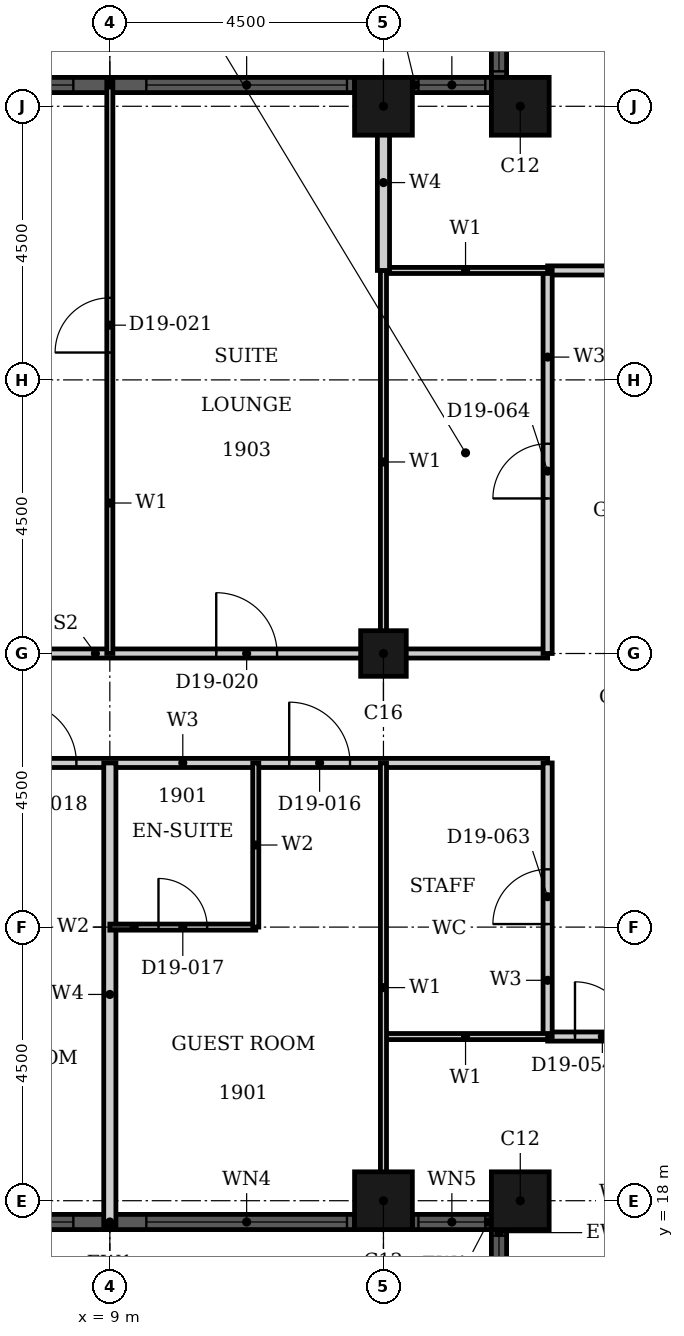
"""IFC4 building model, lengths in metres.
Left out: names, types, materials, properties, quantities, classifications, styles, units other than length and angle.
Written with IfcOpenShell. Run it as: python <this file> out.ifc"""

import sys

from ifc_helpers import new_model, si_unit, direction, frame, frame_2d, origin, origin_2d, place, context, subcontext, project, spatial, rectangle, hollow_rectangle, extrude, element, fill, save


model = new_model("IFC4")
c1 = context("Model", 3, precision=1e-05, world=origin(), true_north=direction((0.0, 1.0)))
c2 = subcontext(c1, "Body", "Model", "MODEL_VIEW")
j1 = project(units=[si_unit("LENGTHUNIT", "METRE"), si_unit("PLANEANGLEUNIT", "RADIAN")], contexts=[c1])
p1 = place(None, origin())
s1 = spatial("IfcSite", under=j1, at=p1, CompositionType="ELEMENT")
p2 = place(p1, origin())
s2 = spatial("IfcBuilding", under=s1, at=p2, CompositionType="ELEMENT")
p3 = place(p2, frame((0.0, 0.0, 81.6)))
s3 = spatial("IfcBuildingStorey", under=s2, at=p3, CompositionType="ELEMENT", Elevation=81.6)
for number, where, z_axis, x_axis in (
    (1, (15.75, 36.0, 0.0), (0.0, 0.0, 1.0), (1.0, 0.0, 0.0)),
    (2, (13.5, 36.0, 0.0), (0.0, 0.0, 1.0), (1.0, 0.0, 0.0)),
    (3, (13.5, 18.0, 0.0), (0.0, 0.0, 1.0), (1.0, 0.0, 0.0)),
    (4, (15.75, 18.0, 0.0), (0.0, 0.0, 1.0), (1.0, 0.0, 0.0)),
):
    element("IfcColumn", number, at=place(p3, frame(where, z_axis=z_axis, x_axis=x_axis)), inside=s3, PredefinedType="COLUMN", context=c2, shape_type="SweptSolid", body=[
        extrude(hollow_rectangle(XDim=0.95, YDim=0.95, WallThickness=0.03, at=origin_2d()), origin(), (0.0, 0.0, 1.0), 3.6),
    ])
p4 = place(p3, frame((13.5, 27.0, 0.0), z_axis=(0.0, 0.0, 1.0), x_axis=(1.0, 0.0, 0.0)))
e5 = element("IfcColumn", 5, at=p4, inside=s3, PredefinedType="COLUMN", context=c2, shape_type="SweptSolid", body=[
    extrude(hollow_rectangle(XDim=0.75, YDim=0.75, WallThickness=0.024, at=origin_2d()), origin(), (0.0, 0.0, 1.0), 3.6),
])
p5 = place(p3, frame((15.4, 37.775, 0.0), z_axis=(0.0, 0.0, 1.0), x_axis=(0.0, -1.0, 0.0)))
e6 = element("IfcWall", 6, at=p5, inside=s3, PredefinedType="SOLIDWALL", context=c2, shape_type="SweptSolid", body=[
    extrude(rectangle(XDim=1.3, YDim=0.25, at=frame_2d((0.65, 0.0))), origin(), (0.0, 0.0, 1.0), 3.6),
])
p6 = place(p5, frame((0.1, 0.0, 0.9)))
e7 = element("IfcOpeningElement", 7, at=p6, cuts=e6, PredefinedType="OPENING", context=c2, shape_type="SweptSolid", body=[
    extrude(rectangle(XDim=1.1, YDim=2.08, at=frame_2d((0.55, 1.04))), frame((0.0, 0.135, 0.0), z_axis=(0.0, -1.0, 0.0), x_axis=(1.0, 0.0, 0.0)), (0.0, 0.0, 1.0), 0.27),
])
p7 = place(p3, frame((15.275, 36.35, 0.0), z_axis=(0.0, 0.0, 1.0), x_axis=(-1.0, 0.0, 0.0)))
e8 = element("IfcWall", 8, at=p7, inside=s3, PredefinedType="SOLIDWALL", context=c2, shape_type="SweptSolid", body=[
    extrude(rectangle(XDim=1.3, YDim=0.25, at=frame_2d((0.65, 0.0))), origin(), (0.0, 0.0, 1.0), 3.6),
])
p8 = place(p7, frame((0.1, 0.0, 0.9)))
e9 = element("IfcOpeningElement", 9, at=p8, cuts=e8, PredefinedType="OPENING", context=c2, shape_type="SweptSolid", body=[
    extrude(rectangle(XDim=1.1, YDim=2.08, at=frame_2d((0.55, 1.04))), frame((0.0, 0.135, 0.0), z_axis=(0.0, -1.0, 0.0), x_axis=(1.0, 0.0, 0.0)), (0.0, 0.0, 1.0), 0.27),
])
p9 = place(p3, frame((13.025, 36.35, 0.0), z_axis=(0.0, 0.0, 1.0), x_axis=(-1.0, 0.0, 0.0)))
e10 = element("IfcWall", 10, at=p9, inside=s3, PredefinedType="SOLIDWALL", context=c2, shape_type="SweptSolid", body=[
    extrude(rectangle(XDim=8.05, YDim=0.25, at=frame_2d((4.025, 0.0))), origin(), (0.0, 0.0, 1.0), 3.6),
])
p10 = place(p9, frame((0.125, 0.0, 0.9)))
e11 = element("IfcOpeningElement", 11, at=p10, cuts=e10, PredefinedType="OPENING", context=c2, shape_type="SweptSolid", body=[
    extrude(rectangle(XDim=3.3, YDim=2.08, at=frame_2d((1.65, 1.04))), frame((0.0, 0.135, 0.0), z_axis=(0.0, -1.0, 0.0), x_axis=(1.0, 0.0, 0.0)), (0.0, 0.0, 1.0), 0.27),
])
p11 = place(p9, frame((4.625, 0.0, 0.9)))
e12 = element("IfcOpeningElement", 12, at=p11, cuts=e10, PredefinedType="OPENING", context=c2, shape_type="SweptSolid", body=[
    extrude(rectangle(XDim=3.3, YDim=2.08, at=frame_2d((1.65, 1.04))), frame((0.0, 0.135, 0.0), z_axis=(0.0, -1.0, 0.0), x_axis=(1.0, 0.0, 0.0)), (0.0, 0.0, 1.0), 0.27),
])
p12 = place(p3, frame((4.975, 17.65, 0.0), z_axis=(0.0, 0.0, 1.0), x_axis=(1.0, 0.0, 0.0)))
e13 = element("IfcWall", 13, at=p12, inside=s3, PredefinedType="SOLIDWALL", context=c2, shape_type="SweptSolid", body=[
    extrude(rectangle(XDim=8.05, YDim=0.25, at=frame_2d((4.025, 0.0))), origin(), (0.0, 0.0, 1.0), 3.6),
])
p13 = place(p12, frame((0.125, 0.0, 0.9)))
e14 = element("IfcOpeningElement", 14, at=p13, cuts=e13, PredefinedType="OPENING", context=c2, shape_type="SweptSolid", body=[
    extrude(rectangle(XDim=3.3, YDim=2.08, at=frame_2d((1.65, 1.04))), frame((0.0, 0.135, 0.0), z_axis=(0.0, -1.0, 0.0), x_axis=(1.0, 0.0, 0.0)), (0.0, 0.0, 1.0), 0.27),
])
p14 = place(p12, frame((4.625, 0.0, 0.9)))
e15 = element("IfcOpeningElement", 15, at=p14, cuts=e13, PredefinedType="OPENING", context=c2, shape_type="SweptSolid", body=[
    extrude(rectangle(XDim=3.3, YDim=2.08, at=frame_2d((1.65, 1.04))), frame((0.0, 0.135, 0.0), z_axis=(0.0, -1.0, 0.0), x_axis=(1.0, 0.0, 0.0)), (0.0, 0.0, 1.0), 0.27),
])
p15 = place(p3, frame((13.975, 17.65, 0.0), z_axis=(0.0, 0.0, 1.0), x_axis=(1.0, 0.0, 0.0)))
e16 = element("IfcWall", 16, at=p15, inside=s3, PredefinedType="SOLIDWALL", context=c2, shape_type="SweptSolid", body=[
    extrude(rectangle(XDim=1.3, YDim=0.25, at=frame_2d((0.65, 0.0))), origin(), (0.0, 0.0, 1.0), 3.6),
])
p16 = place(p15, frame((0.1, 0.0, 0.9)))
e17 = element("IfcOpeningElement", 17, at=p16, cuts=e16, PredefinedType="OPENING", context=c2, shape_type="SweptSolid", body=[
    extrude(rectangle(XDim=1.1, YDim=2.08, at=frame_2d((0.55, 1.04))), frame((0.0, 0.135, 0.0), z_axis=(0.0, -1.0, 0.0), x_axis=(1.0, 0.0, 0.0)), (0.0, 0.0, 1.0), 0.27),
])
p17 = place(p3, frame((15.4, 17.525, 0.0), z_axis=(0.0, 0.0, 1.0), x_axis=(0.0, -1.0, 0.0)))
e18 = element("IfcWall", 18, at=p17, inside=s3, PredefinedType="SOLIDWALL", context=c2, shape_type="SweptSolid", body=[
    extrude(rectangle(XDim=1.3, YDim=0.25, at=frame_2d((0.65, 0.0))), origin(), (0.0, 0.0, 1.0), 3.6),
])
p18 = place(p17, frame((0.1, 0.0, 0.9)))
e19 = element("IfcOpeningElement", 19, at=p18, cuts=e18, PredefinedType="OPENING", context=c2, shape_type="SweptSolid", body=[
    extrude(rectangle(XDim=1.1, YDim=2.08, at=frame_2d((0.55, 1.04))), frame((0.0, 0.135, 0.0), z_axis=(0.0, -1.0, 0.0), x_axis=(1.0, 0.0, 0.0)), (0.0, 0.0, 1.0), 0.27),
])
p19 = place(p3, frame((16.2, 20.7, 0.0), z_axis=(0.0, 0.0, 1.0), x_axis=(1.0, 0.0, 0.0)))
e20 = element("IfcWall", 20, at=p19, inside=s3, PredefinedType="PARTITIONING", context=c2, shape_type="SweptSolid", body=[
    extrude(rectangle(XDim=13.5, YDim=0.15, at=frame_2d((6.75, 0.0))), origin(), (0.0, 0.0, 1.0), 3.3),
])
p20 = place(p19, frame((4.75, 0.0, 0.0)))
e21 = element("IfcOpeningElement", 21, at=p20, cuts=e20, PredefinedType="OPENING", context=c2, shape_type="SweptSolid", body=[
    extrude(rectangle(XDim=1.0, YDim=2.1, at=frame_2d((0.5, 1.05))), frame((0.0, 0.085, 0.0), z_axis=(0.0, -1.0, 0.0), x_axis=(1.0, 0.0, 0.0)), (0.0, 0.0, 1.0), 0.17),
])
p21 = place(p19, frame((0.45, 0.0, 0.0)))
e22 = element("IfcOpeningElement", 22, at=p21, cuts=e20, PredefinedType="OPENING", context=c2, shape_type="SweptSolid", body=[
    extrude(rectangle(XDim=0.9, YDim=2.1, at=frame_2d((0.45, 1.05))), frame((0.0, 0.085, 0.0), z_axis=(0.0, -1.0, 0.0), x_axis=(1.0, 0.0, 0.0)), (0.0, 0.0, 1.0), 0.17),
])
p22 = place(p19, frame((9.45, 0.0, 0.0)))
e23 = element("IfcOpeningElement", 23, at=p22, cuts=e20, PredefinedType="OPENING", context=c2, shape_type="SweptSolid", body=[
    extrude(rectangle(XDim=0.9, YDim=2.1, at=frame_2d((0.45, 1.05))), frame((0.0, 0.085, 0.0), z_axis=(0.0, -1.0, 0.0), x_axis=(1.0, 0.0, 0.0)), (0.0, 0.0, 1.0), 0.17),
])
p23 = place(p3, frame((4.5, 25.2, 0.0), z_axis=(0.0, 0.0, 1.0), x_axis=(1.0, 0.0, 0.0)))
e24 = element("IfcWall", 24, at=p23, inside=s3, PredefinedType="PARTITIONING", context=c2, shape_type="SweptSolid", body=[
    extrude(rectangle(XDim=11.7, YDim=0.15, at=frame_2d((5.85, 0.0))), origin(), (0.0, 0.0, 1.0), 3.3),
])
p24 = place(p23, frame((7.45, 0.0, 0.0)))
e25 = element("IfcOpeningElement", 25, at=p24, cuts=e24, PredefinedType="OPENING", context=c2, shape_type="SweptSolid", body=[
    extrude(rectangle(XDim=1.0, YDim=2.1, at=frame_2d((0.5, 1.05))), frame((0.0, 0.085, 0.0), z_axis=(0.0, -1.0, 0.0), x_axis=(1.0, 0.0, 0.0)), (0.0, 0.0, 1.0), 0.17),
])
p25 = place(p23, frame((2.95, 0.0, 0.0)))
e26 = element("IfcOpeningElement", 26, at=p25, cuts=e24, PredefinedType="OPENING", context=c2, shape_type="SweptSolid", body=[
    extrude(rectangle(XDim=1.0, YDim=2.1, at=frame_2d((0.5, 1.05))), frame((0.0, 0.085, 0.0), z_axis=(0.0, -1.0, 0.0), x_axis=(1.0, 0.0, 0.0)), (0.0, 0.0, 1.0), 0.17),
])
p26 = place(p3, frame((4.5, 27.0, 0.0), z_axis=(0.0, 0.0, 1.0), x_axis=(1.0, 0.0, 0.0)))
e27 = element("IfcWall", 27, at=p26, inside=s3, PredefinedType="PARTITIONING", context=c2, shape_type="SweptSolid", body=[
    extrude(rectangle(XDim=11.7, YDim=0.15, at=frame_2d((5.85, 0.0))), origin(), (0.0, 0.0, 1.0), 2.58),
])
p27 = place(p26, frame((6.25, 0.0, 0.0)))
e28 = element("IfcOpeningElement", 28, at=p27, cuts=e27, PredefinedType="OPENING", context=c2, shape_type="SweptSolid", body=[
    extrude(rectangle(XDim=1.0, YDim=2.1, at=frame_2d((0.5, 1.05))), frame((0.0, 0.085, 0.0), z_axis=(0.0, -1.0, 0.0), x_axis=(1.0, 0.0, 0.0)), (0.0, 0.0, 1.0), 0.17),
])
p28 = place(p3, frame((16.2, 33.3, 0.0), z_axis=(0.0, 0.0, 1.0), x_axis=(1.0, 0.0, 0.0)))
e29 = element("IfcWall", 29, at=p28, inside=s3, PredefinedType="PARTITIONING", context=c2, shape_type="SweptSolid", body=[
    extrude(rectangle(XDim=15.3, YDim=0.15, at=frame_2d((7.65, 0.0))), origin(), (0.0, 0.0, 1.0), 3.3),
])
p29 = place(p28, frame((4.75, 0.0, 0.0)))
e30 = element("IfcOpeningElement", 30, at=p29, cuts=e29, PredefinedType="OPENING", context=c2, shape_type="SweptSolid", body=[
    extrude(rectangle(XDim=1.0, YDim=2.1, at=frame_2d((0.5, 1.05))), frame((0.0, 0.085, 0.0), z_axis=(0.0, -1.0, 0.0), x_axis=(1.0, 0.0, 0.0)), (0.0, 0.0, 1.0), 0.17),
])
p30 = place(p28, frame((7.65, 0.0, 0.0)))
e31 = element("IfcOpeningElement", 31, at=p30, cuts=e29, PredefinedType="OPENING", context=c2, shape_type="SweptSolid", body=[
    extrude(rectangle(XDim=0.9, YDim=2.1, at=frame_2d((0.45, 1.05))), frame((0.0, 0.085, 0.0), z_axis=(0.0, -1.0, 0.0), x_axis=(1.0, 0.0, 0.0)), (0.0, 0.0, 1.0), 0.17),
])
p31 = place(p28, frame((12.15, 0.0, 0.0)))
e32 = element("IfcOpeningElement", 32, at=p31, cuts=e29, PredefinedType="OPENING", context=c2, shape_type="SweptSolid", body=[
    extrude(rectangle(XDim=0.9, YDim=2.1, at=frame_2d((0.45, 1.05))), frame((0.0, 0.085, 0.0), z_axis=(0.0, -1.0, 0.0), x_axis=(1.0, 0.0, 0.0)), (0.0, 0.0, 1.0), 0.17),
])
p32 = place(p3, frame((16.2, 27.0, 0.0), z_axis=(0.0, 0.0, 1.0), x_axis=(0.0, 1.0, 0.0)))
e33 = element("IfcWall", 33, at=p32, inside=s3, PredefinedType="PARTITIONING", context=c2, shape_type="SweptSolid", body=[
    extrude(rectangle(XDim=6.3, YDim=0.15, at=frame_2d((3.15, 0.0))), origin(), (0.0, 0.0, 1.0), 3.3),
])
p33 = place(p32, frame((2.55, 0.0, 0.0)))
e34 = element("IfcOpeningElement", 34, at=p33, cuts=e33, PredefinedType="OPENING", context=c2, shape_type="SweptSolid", body=[
    extrude(rectangle(XDim=0.9, YDim=2.1, at=frame_2d((0.45, 1.05))), frame((0.0, 0.085, 0.0), z_axis=(0.0, -1.0, 0.0), x_axis=(1.0, 0.0, 0.0)), (0.0, 0.0, 1.0), 0.17),
])
p34 = place(p3, frame((16.2, 20.7, 0.0), z_axis=(0.0, 0.0, 1.0), x_axis=(0.0, 1.0, 0.0)))
e35 = element("IfcWall", 35, at=p34, inside=s3, PredefinedType="PARTITIONING", context=c2, shape_type="SweptSolid", body=[
    extrude(rectangle(XDim=4.5, YDim=0.15, at=frame_2d((2.25, 0.0))), origin(), (0.0, 0.0, 1.0), 3.3),
])
p35 = place(p34, frame((1.85, 0.0, 0.0)))
e36 = element("IfcOpeningElement", 36, at=p35, cuts=e35, PredefinedType="OPENING", context=c2, shape_type="SweptSolid", body=[
    extrude(rectangle(XDim=0.9, YDim=2.1, at=frame_2d((0.45, 1.05))), frame((0.0, 0.085, 0.0), z_axis=(0.0, -1.0, 0.0), x_axis=(1.0, 0.0, 0.0)), (0.0, 0.0, 1.0), 0.17),
])
for number, where, z_axis, x_axis in (
    (37, (13.5, 20.7, 0.0), (0.0, 0.0, 1.0), (1.0, 0.0, 0.0)),
    (38, (13.5, 33.3, 0.0), (0.0, 0.0, 1.0), (1.0, 0.0, 0.0)),
):
    element("IfcWall", number, at=place(p3, frame(where, z_axis=z_axis, x_axis=x_axis)), inside=s3, PredefinedType="PARTITIONING", context=c2, shape_type="SweptSolid", body=[
        extrude(rectangle(XDim=2.7, YDim=0.1, at=frame_2d((1.35, 0.0))), origin(), (0.0, 0.0, 1.0), 3.3),
    ])
p36 = place(p3, frame((13.5, 17.81, 0.0), z_axis=(0.0, 0.0, 1.0), x_axis=(0.0, 1.0, 0.0)))
e39 = element("IfcWall", 39, at=p36, inside=s3, PredefinedType="PARTITIONING", context=c2, shape_type="SweptSolid", body=[
    extrude(rectangle(XDim=7.39, YDim=0.1, at=frame_2d((3.695, 0.0))), origin(), (0.0, 0.0, 1.0), 2.38),
])
p37 = place(p3, frame((13.5, 27.0, 0.0), z_axis=(0.0, 0.0, 1.0), x_axis=(0.0, 1.0, 0.0)))
e40 = element("IfcWall", 40, at=p37, inside=s3, PredefinedType="PARTITIONING", context=c2, shape_type="SweptSolid", body=[
    extrude(rectangle(XDim=6.3, YDim=0.1, at=frame_2d((3.15, 0.0))), origin(), (0.0, 0.0, 1.0), 2.38),
])
p38 = place(p3, frame((9.0, 27.0, 0.0), z_axis=(0.0, 0.0, 1.0), x_axis=(0.0, 1.0, 0.0)))
e41 = element("IfcWall", 41, at=p38, inside=s3, PredefinedType="PARTITIONING", context=c2, shape_type="SweptSolid", body=[
    extrude(rectangle(XDim=9.415, YDim=0.1, at=frame_2d((4.708, 0.0))), origin(), (0.0, 0.0, 1.0), 3.3),
])
p39 = place(p38, frame((4.95, 0.0, 0.0)))
e42 = element("IfcOpeningElement", 42, at=p39, cuts=e41, PredefinedType="OPENING", context=c2, shape_type="SweptSolid", body=[
    extrude(rectangle(XDim=0.9, YDim=2.1, at=frame_2d((0.45, 1.05))), frame((0.0, 0.06, 0.0), z_axis=(0.0, -1.0, 0.0), x_axis=(1.0, 0.0, 0.0)), (0.0, 0.0, 1.0), 0.12),
])
p40 = place(p3, frame((13.5, 33.3, 0.0), z_axis=(0.0, 0.0, 1.0), x_axis=(0.0, 1.0, 0.0)))
e43 = element("IfcWall", 43, at=p40, inside=s3, PredefinedType="PARTITIONING", context=c2, shape_type="SweptSolid", body=[
    extrude(rectangle(XDim=2.89, YDim=0.2, at=frame_2d((1.445, 0.0))), origin(), (0.0, 0.0, 1.0), 2.38),
])
p41 = place(p3, frame((9.0, 17.585, 0.0), z_axis=(0.0, 0.0, 1.0), x_axis=(0.0, 1.0, 0.0)))
e44 = element("IfcWall", 44, at=p41, inside=s3, PredefinedType="PARTITIONING", context=c2, shape_type="SweptSolid", body=[
    extrude(rectangle(XDim=7.615, YDim=0.2, at=frame_2d((3.808, 0.0))), origin(), (0.0, 0.0, 1.0), 3.3),
])
p42 = place(p3, frame((9.0, 22.5, 0.0), z_axis=(0.0, 0.0, 1.0), x_axis=(1.0, 0.0, 0.0)))
e45 = element("IfcWall", 45, at=p42, inside=s3, PredefinedType="PARTITIONING", context=c2, shape_type="SweptSolid", body=[
    extrude(rectangle(XDim=2.4, YDim=0.1, at=frame_2d((1.2, 0.0))), origin(), (0.0, 0.0, 1.0), 2.58),
])
p43 = place(p42, frame((0.8, 0.0, 0.0)))
e46 = element("IfcOpeningElement", 46, at=p43, cuts=e45, PredefinedType="OPENING", context=c2, shape_type="SweptSolid", body=[
    extrude(rectangle(XDim=0.8, YDim=2.1, at=frame_2d((0.4, 1.05))), frame((0.0, 0.06, 0.0), z_axis=(0.0, -1.0, 0.0), x_axis=(1.0, 0.0, 0.0)), (0.0, 0.0, 1.0), 0.12),
])
p44 = place(p3, frame((11.4, 22.5, 0.0), z_axis=(0.0, 0.0, 1.0), x_axis=(0.0, 1.0, 0.0)))
e47 = element("IfcWall", 47, at=p44, inside=s3, PredefinedType="PARTITIONING", context=c2, shape_type="SweptSolid", body=[
    extrude(rectangle(XDim=2.7, YDim=0.1, at=frame_2d((1.35, 0.0))), origin(), (0.0, 0.0, 1.0), 3.3),
])
p45 = place(p6, origin())
e48 = element("IfcWindow", 48, at=p45, inside=s3, PartitioningType="SINGLE_PANEL", PredefinedType="WINDOW", context=c2, shape_type="SweptSolid", body=[
    extrude(rectangle(XDim=1.1, YDim=2.08, at=frame_2d((0.55, 1.04))), frame((0.0, 0.03, 0.0), z_axis=(0.0, -1.0, 0.0), x_axis=(1.0, 0.0, 0.0)), (0.0, 0.0, 1.0), 0.06),
])
fill(e7, e48)
p46 = place(p8, origin())
e49 = element("IfcWindow", 49, at=p46, inside=s3, PartitioningType="SINGLE_PANEL", PredefinedType="WINDOW", context=c2, shape_type="SweptSolid", body=[
    extrude(rectangle(XDim=1.1, YDim=2.08, at=frame_2d((0.55, 1.04))), frame((0.0, 0.03, 0.0), z_axis=(0.0, -1.0, 0.0), x_axis=(1.0, 0.0, 0.0)), (0.0, 0.0, 1.0), 0.06),
])
fill(e9, e49)
p47 = place(p10, origin())
e50 = element("IfcWindow", 50, at=p47, inside=s3, PartitioningType="SINGLE_PANEL", PredefinedType="WINDOW", context=c2, shape_type="SweptSolid", body=[
    extrude(rectangle(XDim=3.3, YDim=2.08, at=frame_2d((1.65, 1.04))), frame((0.0, 0.03, 0.0), z_axis=(0.0, -1.0, 0.0), x_axis=(1.0, 0.0, 0.0)), (0.0, 0.0, 1.0), 0.06),
])
fill(e11, e50)
p48 = place(p11, origin())
e51 = element("IfcWindow", 51, at=p48, inside=s3, PartitioningType="SINGLE_PANEL", PredefinedType="WINDOW", context=c2, shape_type="SweptSolid", body=[
    extrude(rectangle(XDim=3.3, YDim=2.08, at=frame_2d((1.65, 1.04))), frame((0.0, 0.03, 0.0), z_axis=(0.0, -1.0, 0.0), x_axis=(1.0, 0.0, 0.0)), (0.0, 0.0, 1.0), 0.06),
])
fill(e12, e51)
p49 = place(p13, origin())
e52 = element("IfcWindow", 52, at=p49, inside=s3, PartitioningType="SINGLE_PANEL", PredefinedType="WINDOW", context=c2, shape_type="SweptSolid", body=[
    extrude(rectangle(XDim=3.3, YDim=2.08, at=frame_2d((1.65, 1.04))), frame((0.0, 0.03, 0.0), z_axis=(0.0, -1.0, 0.0), x_axis=(1.0, 0.0, 0.0)), (0.0, 0.0, 1.0), 0.06),
])
fill(e14, e52)
p50 = place(p14, origin())
e53 = element("IfcWindow", 53, at=p50, inside=s3, PartitioningType="SINGLE_PANEL", PredefinedType="WINDOW", context=c2, shape_type="SweptSolid", body=[
    extrude(rectangle(XDim=3.3, YDim=2.08, at=frame_2d((1.65, 1.04))), frame((0.0, 0.03, 0.0), z_axis=(0.0, -1.0, 0.0), x_axis=(1.0, 0.0, 0.0)), (0.0, 0.0, 1.0), 0.06),
])
fill(e15, e53)
p51 = place(p16, origin())
e54 = element("IfcWindow", 54, at=p51, inside=s3, PartitioningType="SINGLE_PANEL", PredefinedType="WINDOW", context=c2, shape_type="SweptSolid", body=[
    extrude(rectangle(XDim=1.1, YDim=2.08, at=frame_2d((0.55, 1.04))), frame((0.0, 0.03, 0.0), z_axis=(0.0, -1.0, 0.0), x_axis=(1.0, 0.0, 0.0)), (0.0, 0.0, 1.0), 0.06),
])
fill(e17, e54)
p52 = place(p18, origin())
e55 = element("IfcWindow", 55, at=p52, inside=s3, PartitioningType="SINGLE_PANEL", PredefinedType="WINDOW", context=c2, shape_type="SweptSolid", body=[
    extrude(rectangle(XDim=1.1, YDim=2.08, at=frame_2d((0.55, 1.04))), frame((0.0, 0.03, 0.0), z_axis=(0.0, -1.0, 0.0), x_axis=(1.0, 0.0, 0.0)), (0.0, 0.0, 1.0), 0.06),
])
fill(e19, e55)
p53 = place(p24, origin())
e56 = element("IfcDoor", 56, at=p53, inside=s3, OperationType="SINGLE_SWING_RIGHT", PredefinedType="DOOR", context=c2, shape_type="SweptSolid", body=[
    extrude(rectangle(XDim=1.0, YDim=2.1, at=frame_2d((0.5, 1.05))), frame((0.0, 0.025, 0.0), z_axis=(0.0, -1.0, 0.0), x_axis=(1.0, 0.0, 0.0)), (0.0, 0.0, 1.0), 0.05),
])
fill(e25, e56)
p54 = place(p43, origin())
e57 = element("IfcDoor", 57, at=p54, inside=s3, OperationType="SINGLE_SWING_LEFT", PredefinedType="DOOR", context=c2, shape_type="SweptSolid", body=[
    extrude(rectangle(XDim=0.8, YDim=2.1, at=frame_2d((0.4, 1.05))), frame((0.0, 0.025, 0.0), z_axis=(0.0, -1.0, 0.0), x_axis=(1.0, 0.0, 0.0)), (0.0, 0.0, 1.0), 0.05),
])
fill(e46, e57)
p55 = place(p25, origin())
e58 = element("IfcDoor", 58, at=p55, inside=s3, OperationType="SINGLE_SWING_RIGHT", PredefinedType="DOOR", context=c2, shape_type="SweptSolid", body=[
    extrude(rectangle(XDim=1.0, YDim=2.1, at=frame_2d((0.5, 1.05))), frame((0.0, 0.025, 0.0), z_axis=(0.0, -1.0, 0.0), x_axis=(1.0, 0.0, 0.0)), (0.0, 0.0, 1.0), 0.05),
])
fill(e26, e58)
p56 = place(p27, origin())
e59 = element("IfcDoor", 59, at=p56, inside=s3, OperationType="SINGLE_SWING_LEFT", PredefinedType="DOOR", context=c2, shape_type="SweptSolid", body=[
    extrude(rectangle(XDim=1.0, YDim=2.1, at=frame_2d((0.5, 1.05))), frame((0.0, 0.025, 0.0), z_axis=(0.0, -1.0, 0.0), x_axis=(1.0, 0.0, 0.0)), (0.0, 0.0, 1.0), 0.05),
])
fill(e28, e59)
p57 = place(p39, origin())
e60 = element("IfcDoor", 60, at=p57, inside=s3, OperationType="SINGLE_SWING_RIGHT", PredefinedType="DOOR", context=c2, shape_type="SweptSolid", body=[
    extrude(rectangle(XDim=0.9, YDim=2.1, at=frame_2d((0.45, 1.05))), frame((0.0, 0.025, 0.0), z_axis=(0.0, -1.0, 0.0), x_axis=(1.0, 0.0, 0.0)), (0.0, 0.0, 1.0), 0.05),
])
fill(e42, e60)
p58 = place(p21, origin())
e61 = element("IfcDoor", 61, at=p58, inside=s3, OperationType="SINGLE_SWING_RIGHT", PredefinedType="DOOR", context=c2, shape_type="SweptSolid", body=[
    extrude(rectangle(XDim=0.9, YDim=2.1, at=frame_2d((0.45, 1.05))), frame((0.0, 0.025, 0.0), z_axis=(0.0, -1.0, 0.0), x_axis=(1.0, 0.0, 0.0)), (0.0, 0.0, 1.0), 0.05),
])
fill(e22, e61)
p59 = place(p35, origin())
e62 = element("IfcDoor", 62, at=p59, inside=s3, OperationType="SINGLE_SWING_RIGHT", PredefinedType="DOOR", context=c2, shape_type="SweptSolid", body=[
    extrude(rectangle(XDim=0.9, YDim=2.1, at=frame_2d((0.45, 1.05))), frame((0.0, 0.025, 0.0), z_axis=(0.0, -1.0, 0.0), x_axis=(1.0, 0.0, 0.0)), (0.0, 0.0, 1.0), 0.05),
])
fill(e36, e62)
p60 = place(p33, origin())
e63 = element("IfcDoor", 63, at=p60, inside=s3, OperationType="SINGLE_SWING_LEFT", PredefinedType="DOOR", context=c2, shape_type="SweptSolid", body=[
    extrude(rectangle(XDim=0.9, YDim=2.1, at=frame_2d((0.45, 1.05))), frame((0.0, 0.025, 0.0), z_axis=(0.0, -1.0, 0.0), x_axis=(1.0, 0.0, 0.0)), (0.0, 0.0, 1.0), 0.05),
])
fill(e34, e63)
save(model, sys.argv[1])
